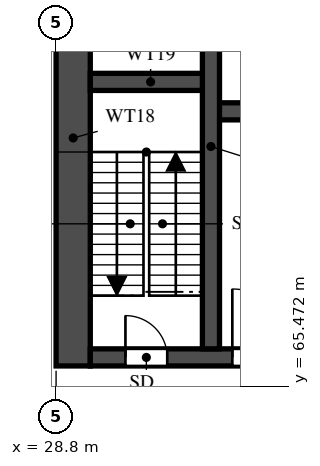
"""IFC4 building model, lengths in metres.
Left out: names, types, materials, properties, quantities, classifications, styles, units other than length and angle.
Written with IfcOpenShell. Run it as: python <this file> out.ifc"""

import sys

from ifc_helpers import new_model, si_unit, direction, frame, frame_2d, origin, place, context, subcontext, project, spatial, rectangle, extrude, element, fill, save


model = new_model("IFC4")
c1 = context("Model", 3, precision=1e-05, world=origin(), true_north=direction((0.0, 1.0)))
c2 = subcontext(c1, "Body", "Model", "MODEL_VIEW")
j1 = project(units=[si_unit("LENGTHUNIT", "METRE"), si_unit("PLANEANGLEUNIT", "RADIAN")], contexts=[c1])
p1 = place(None, origin())
s1 = spatial("IfcSite", under=j1, at=p1, CompositionType="ELEMENT")
p2 = place(p1, origin())
s2 = spatial("IfcBuilding", under=s1, at=p2, CompositionType="ELEMENT")
p3 = place(p2, frame((0.0, 0.0, 21.6)))
s3 = spatial("IfcBuildingStorey", under=s2, at=p3, CompositionType="ELEMENT", Elevation=21.6)
p4 = place(p3, frame((29.25, 66.0, 0.0), z_axis=(0.0, 0.0, 1.0), x_axis=(0.0, 1.0, 0.0)))
e1 = element("IfcWall", 1, at=p4, inside=s3, PredefinedType="SHEAR", context=c2, shape_type="SweptSolid", body=[
    extrude(rectangle(XDim=12.0, YDim=0.9, at=frame_2d((6.0, 0.0))), origin(), (0.0, 0.0, 1.0), 4.95),
])
p5 = place(p3, frame((29.7, 66.225, 0.0), z_axis=(0.0, 0.0, 1.0), x_axis=(1.0, 0.0, 0.0)))
e2 = element("IfcWall", 2, at=p5, inside=s3, PredefinedType="SHEAR", context=c2, shape_type="SweptSolid", body=[
    extrude(rectangle(XDim=41.4, YDim=0.45, at=frame_2d((20.7, 0.0))), origin(), (0.0, 0.0, 1.0), 4.95),
])
p6 = place(p5, frame((0.925, 0.0, 0.0)))
e3 = element("IfcOpeningElement", 3, at=p6, cuts=e2, PredefinedType="OPENING", context=c2, shape_type="SweptSolid", body=[
    extrude(rectangle(XDim=1.1, YDim=2.1, at=frame_2d((0.55, 1.05))), frame((0.0, 0.235, 0.0), z_axis=(0.0, -1.0, 0.0), x_axis=(1.0, 0.0, 0.0)), (0.0, 0.0, 1.0), 0.47),
])
p7 = place(p5, frame((3.738, 0.0, 0.0)))
e4 = element("IfcOpeningElement", 4, at=p7, cuts=e2, PredefinedType="OPENING", context=c2, shape_type="SweptSolid", body=[
    extrude(rectangle(XDim=1.8, YDim=2.1, at=frame_2d((0.9, 1.05))), frame((0.0, 0.235, 0.0), z_axis=(0.0, -1.0, 0.0), x_axis=(1.0, 0.0, 0.0)), (0.0, 0.0, 1.0), 0.47),
])
p8 = place(p3, frame((32.875, 72.7, 0.0), z_axis=(0.0, 0.0, 1.0), x_axis=(1.0, 0.0, 0.0)))
e5 = element("IfcWall", 5, at=p8, inside=s3, PredefinedType="SHEAR", context=c2, shape_type="SweptSolid", body=[
    extrude(rectangle(XDim=35.05, YDim=0.45, at=frame_2d((17.525, 0.0))), origin(), (0.0, 0.0, 1.0), 4.95),
])
p9 = place(p8, frame((19.8, 0.0, 0.0)))
e6 = element("IfcOpeningElement", 6, at=p9, cuts=e5, PredefinedType="OPENING", context=c2, shape_type="SweptSolid", body=[
    extrude(rectangle(XDim=1.1, YDim=2.1, at=frame_2d((0.55, 1.05))), frame((0.0, 0.235, 0.0), z_axis=(0.0, -1.0, 0.0), x_axis=(1.0, 0.0, 0.0)), (0.0, 0.0, 1.0), 0.47),
])
p10 = place(p8, frame((27.65, 0.0, 0.0)))
e7 = element("IfcOpeningElement", 7, at=p10, cuts=e5, PredefinedType="OPENING", context=c2, shape_type="SweptSolid", body=[
    extrude(rectangle(XDim=1.1, YDim=2.1, at=frame_2d((0.55, 1.05))), frame((0.0, 0.235, 0.0), z_axis=(0.0, -1.0, 0.0), x_axis=(1.0, 0.0, 0.0)), (0.0, 0.0, 1.0), 0.47),
])
p11 = place(p8, frame((30.25, 0.0, 0.0)))
e8 = element("IfcOpeningElement", 8, at=p11, cuts=e5, PredefinedType="OPENING", context=c2, shape_type="SweptSolid", body=[
    extrude(rectangle(XDim=1.1, YDim=2.1, at=frame_2d((0.55, 1.05))), frame((0.0, 0.235, 0.0), z_axis=(0.0, -1.0, 0.0), x_axis=(1.0, 0.0, 0.0)), (0.0, 0.0, 1.0), 0.47),
])
p12 = place(p8, frame((3.75, 0.0, 0.0)))
e9 = element("IfcOpeningElement", 9, at=p12, cuts=e5, PredefinedType="OPENING", context=c2, shape_type="SweptSolid", body=[
    extrude(rectangle(XDim=1.1, YDim=2.1, at=frame_2d((0.55, 1.05))), frame((0.0, 0.235, 0.0), z_axis=(0.0, -1.0, 0.0), x_axis=(1.0, 0.0, 0.0)), (0.0, 0.0, 1.0), 0.47),
])
p13 = place(p8, frame((6.5, 0.0, 0.0)))
e10 = element("IfcOpeningElement", 10, at=p13, cuts=e5, PredefinedType="OPENING", context=c2, shape_type="SweptSolid", body=[
    extrude(rectangle(XDim=1.1, YDim=2.1, at=frame_2d((0.55, 1.05))), frame((0.0, 0.235, 0.0), z_axis=(0.0, -1.0, 0.0), x_axis=(1.0, 0.0, 0.0)), (0.0, 0.0, 1.0), 0.47),
])
p14 = place(p8, frame((9.25, 0.0, 0.0)))
e11 = element("IfcOpeningElement", 11, at=p14, cuts=e5, PredefinedType="OPENING", context=c2, shape_type="SweptSolid", body=[
    extrude(rectangle(XDim=1.1, YDim=2.1, at=frame_2d((0.55, 1.05))), frame((0.0, 0.235, 0.0), z_axis=(0.0, -1.0, 0.0), x_axis=(1.0, 0.0, 0.0)), (0.0, 0.0, 1.0), 0.47),
])
p15 = place(p8, frame((12.0, 0.0, 0.0)))
e12 = element("IfcOpeningElement", 12, at=p15, cuts=e5, PredefinedType="OPENING", context=c2, shape_type="SweptSolid", body=[
    extrude(rectangle(XDim=1.1, YDim=2.1, at=frame_2d((0.55, 1.05))), frame((0.0, 0.235, 0.0), z_axis=(0.0, -1.0, 0.0), x_axis=(1.0, 0.0, 0.0)), (0.0, 0.0, 1.0), 0.47),
])
p16 = place(p8, frame((14.75, 0.0, 0.0)))
e13 = element("IfcOpeningElement", 13, at=p16, cuts=e5, PredefinedType="OPENING", context=c2, shape_type="SweptSolid", body=[
    extrude(rectangle(XDim=1.1, YDim=2.1, at=frame_2d((0.55, 1.05))), frame((0.0, 0.235, 0.0), z_axis=(0.0, -1.0, 0.0), x_axis=(1.0, 0.0, 0.0)), (0.0, 0.0, 1.0), 0.47),
])
p17 = place(p8, frame((17.5, 0.0, 0.0)))
e14 = element("IfcOpeningElement", 14, at=p17, cuts=e5, PredefinedType="OPENING", context=c2, shape_type="SweptSolid", body=[
    extrude(rectangle(XDim=1.1, YDim=2.1, at=frame_2d((0.55, 1.05))), frame((0.0, 0.235, 0.0), z_axis=(0.0, -1.0, 0.0), x_axis=(1.0, 0.0, 0.0)), (0.0, 0.0, 1.0), 0.47),
])
p18 = place(p8, frame((0.913, 0.0, 0.0)))
e15 = element("IfcOpeningElement", 15, at=p18, cuts=e5, PredefinedType="OPENING", context=c2, shape_type="SweptSolid", body=[
    extrude(rectangle(XDim=1.1, YDim=2.1, at=frame_2d((0.55, 1.05))), frame((0.0, 0.235, 0.0), z_axis=(0.0, -1.0, 0.0), x_axis=(1.0, 0.0, 0.0)), (0.0, 0.0, 1.0), 0.47),
])
p19 = place(p3, frame((29.7, 73.475, 0.0), z_axis=(0.0, 0.0, 1.0), x_axis=(1.0, 0.0, 0.0)))
e16 = element("IfcWall", 16, at=p19, inside=s3, PredefinedType="SHEAR", context=c2, shape_type="SweptSolid", body=[
    extrude(rectangle(XDim=3.175, YDim=0.45, at=frame_2d((1.587, 0.0))), origin(), (0.0, 0.0, 1.0), 4.95),
])
p20 = place(p3, frame((32.875, 66.45, 0.0), z_axis=(0.0, 0.0, 1.0), x_axis=(0.0, 1.0, 0.0)))
e17 = element("IfcWall", 17, at=p20, inside=s3, PredefinedType="SHEAR", context=c2, shape_type="SweptSolid", body=[
    extrude(rectangle(XDim=10.65, YDim=0.45, at=frame_2d((5.325, 0.0))), origin(), (0.0, 0.0, 1.0), 4.95),
])
p21 = place(p6, origin())
e18 = element("IfcDoor", 18, at=p21, inside=s3, OperationType="SINGLE_SWING_LEFT", PredefinedType="DOOR", context=c2, shape_type="SweptSolid", body=[
    extrude(rectangle(XDim=1.1, YDim=2.1, at=frame_2d((0.55, 1.05))), frame((0.0, 0.025, 0.0), z_axis=(0.0, -1.0, 0.0), x_axis=(1.0, 0.0, 0.0)), (0.0, 0.0, 1.0), 0.05),
])
fill(e3, e18)
p22 = place(p7, origin())
e19 = element("IfcDoor", 19, at=p22, inside=s3, OperationType="DOUBLE_DOOR_SINGLE_SWING", PredefinedType="DOOR", context=c2, shape_type="SweptSolid", body=[
    extrude(rectangle(XDim=1.8, YDim=2.1, at=frame_2d((0.9, 1.05))), frame((0.0, 0.025, 0.0), z_axis=(0.0, -1.0, 0.0), x_axis=(1.0, 0.0, 0.0)), (0.0, 0.0, 1.0), 0.05),
])
fill(e4, e19)
save(model, sys.argv[1])
